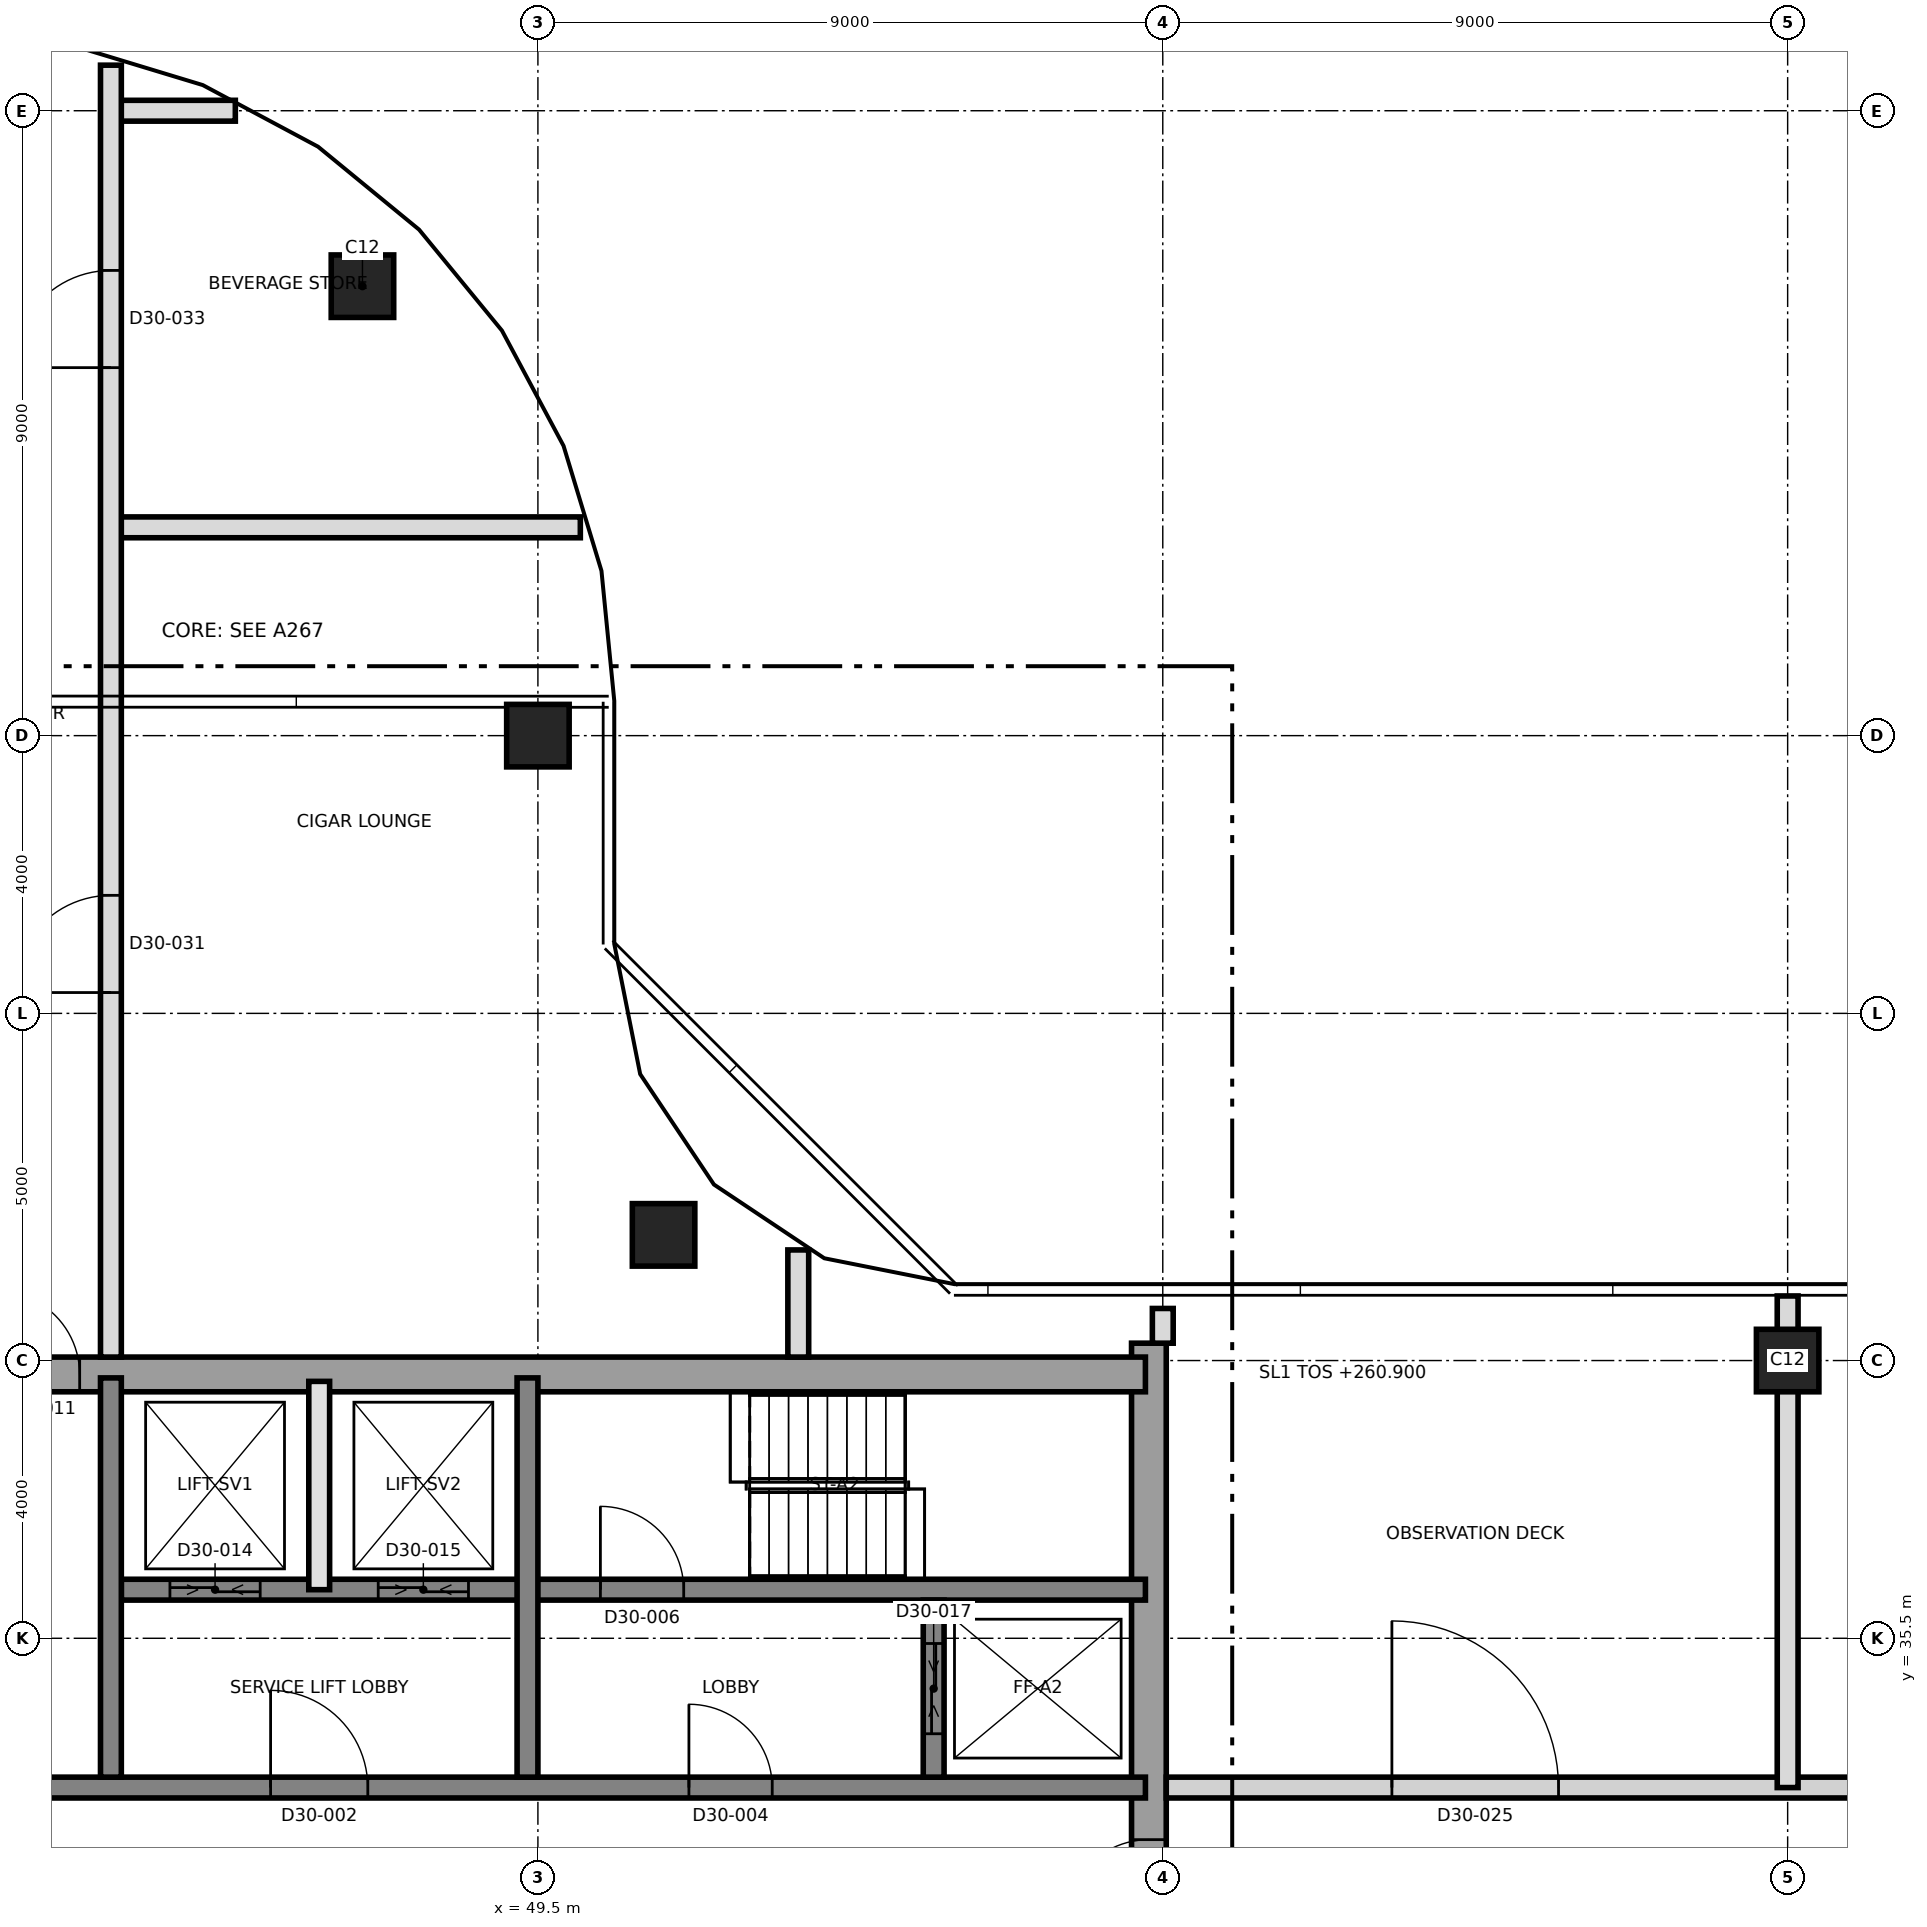
"""IFC4 building model, lengths in metres.
Left out: names, types, materials, properties, quantities, classifications, styles, units other than length and angle.
Written with IfcOpenShell. Run it as: python <this file> out.ifc"""

import sys

from ifc_helpers import new_model, si_unit, direction, frame, frame_2d, origin, origin_2d, place, context, subcontext, project, spatial, rectangle, extrude, element, fill, save


model = new_model("IFC4")
c1 = context("Model", 3, precision=1e-05, world=origin(), true_north=direction((0.0, 1.0)))
c2 = subcontext(c1, "Body", "Model", "MODEL_VIEW")
j1 = project(units=[si_unit("LENGTHUNIT", "METRE"), si_unit("PLANEANGLEUNIT", "RADIAN")], contexts=[c1])
p1 = place(None, origin())
s1 = spatial("IfcSite", under=j1, at=p1, CompositionType="ELEMENT")
p2 = place(p1, origin())
s2 = spatial("IfcBuilding", under=s1, at=p2, CompositionType="ELEMENT")
p3 = place(p2, frame((0.0, 0.0, 260.9)))
s3 = spatial("IfcBuildingStorey", under=s2, at=p3, CompositionType="ELEMENT", Elevation=260.9)
p4 = place(p3, frame((58.3, 21.25, 0.0), z_axis=(0.0, 0.0, 1.0), x_axis=(0.0, 1.0, 0.0)))
e1 = element("IfcWall", 1, at=p4, inside=s3, PredefinedType="SHEAR", context=c2, shape_type="SweptSolid", body=[
    extrude(rectangle(XDim=18.5, YDim=0.5, at=frame_2d((9.25, 0.0))), origin(), (0.0, 0.0, 1.0), 6.0),
])
p5 = place(p4, frame((10.15, 0.0, 0.0)))
e2 = element("IfcOpeningElement", 2, at=p5, cuts=e1, PredefinedType="OPENING", context=c2, shape_type="SweptSolid", body=[
    extrude(rectangle(XDim=1.2, YDim=2.1, at=frame_2d((0.6, 1.05))), frame((0.0, 0.26, 0.0), z_axis=(0.0, -1.0, 0.0), x_axis=(1.0, 0.0, 0.0)), (0.0, 0.0, 1.0), 0.52),
])
p6 = place(p3, frame((31.25, 39.3, 0.0), z_axis=(0.0, 0.0, 1.0), x_axis=(1.0, 0.0, 0.0)))
e3 = element("IfcWall", 3, at=p6, inside=s3, PredefinedType="SHEAR", context=c2, shape_type="SweptSolid", body=[
    extrude(rectangle(XDim=27.0, YDim=0.5, at=frame_2d((13.5, 0.0))), origin(), (0.0, 0.0, 1.0), 6.0),
])
p7 = place(p6, frame((10.45, 0.0, 0.0)))
e4 = element("IfcOpeningElement", 4, at=p7, cuts=e3, PredefinedType="OPENING", context=c2, shape_type="SweptSolid", body=[
    extrude(rectangle(XDim=1.2, YDim=2.1, at=frame_2d((0.6, 1.05))), frame((0.0, 0.26, 0.0), z_axis=(0.0, -1.0, 0.0), x_axis=(1.0, 0.0, 0.0)), (0.0, 0.0, 1.0), 0.52),
])
p8 = place(p3, frame((31.75, 33.35, 0.0), z_axis=(0.0, 0.0, 1.0), x_axis=(1.0, 0.0, 0.0)))
e5 = element("IfcWall", 5, at=p8, inside=s3, PredefinedType="SHEAR", context=c2, shape_type="SweptSolid", body=[
    extrude(rectangle(XDim=26.5, YDim=0.3, at=frame_2d((13.25, 0.0))), origin(), (0.0, 0.0, 1.0), 6.0),
])
p9 = place(p8, frame((13.9, 0.0, 0.0)))
e6 = element("IfcOpeningElement", 6, at=p9, cuts=e5, PredefinedType="OPENING", context=c2, shape_type="SweptSolid", body=[
    extrude(rectangle(XDim=1.4, YDim=2.1, at=frame_2d((0.7, 1.05))), frame((0.0, 0.16, 0.0), z_axis=(0.0, -1.0, 0.0), x_axis=(1.0, 0.0, 0.0)), (0.0, 0.0, 1.0), 0.32),
])
p10 = place(p8, frame((5.375, 0.0, 0.0)))
e7 = element("IfcOpeningElement", 7, at=p10, cuts=e5, PredefinedType="OPENING", context=c2, shape_type="SweptSolid", body=[
    extrude(rectangle(XDim=1.2, YDim=2.1, at=frame_2d((0.6, 1.05))), frame((0.0, 0.16, 0.0), z_axis=(0.0, -1.0, 0.0), x_axis=(1.0, 0.0, 0.0)), (0.0, 0.0, 1.0), 0.32),
])
p11 = place(p8, frame((19.925, 0.0, 0.0)))
e8 = element("IfcOpeningElement", 8, at=p11, cuts=e5, PredefinedType="OPENING", context=c2, shape_type="SweptSolid", body=[
    extrude(rectangle(XDim=1.2, YDim=2.1, at=frame_2d((0.6, 1.05))), frame((0.0, 0.16, 0.0), z_axis=(0.0, -1.0, 0.0), x_axis=(1.0, 0.0, 0.0)), (0.0, 0.0, 1.0), 0.32),
])
p12 = place(p3, frame((43.5, 36.2, 0.0), z_axis=(0.0, 0.0, 1.0), x_axis=(1.0, 0.0, 0.0)))
e9 = element("IfcWall", 9, at=p12, inside=s3, PredefinedType="SHEAR", context=c2, shape_type="SweptSolid", body=[
    extrude(rectangle(XDim=14.75, YDim=0.3, at=frame_2d((7.375, 0.0))), origin(), (0.0, 0.0, 1.0), 6.0),
])
p13 = place(p12, frame((6.9, 0.0, 0.0)))
e10 = element("IfcOpeningElement", 10, at=p13, cuts=e9, PredefinedType="OPENING", context=c2, shape_type="SweptSolid", body=[
    extrude(rectangle(XDim=1.2, YDim=2.1, at=frame_2d((0.6, 1.05))), frame((0.0, 0.16, 0.0), z_axis=(0.0, -1.0, 0.0), x_axis=(1.0, 0.0, 0.0)), (0.0, 0.0, 1.0), 0.32),
])
p14 = place(p12, frame((0.7, 0.0, 0.0)))
e11 = element("IfcOpeningElement", 11, at=p14, cuts=e9, PredefinedType="OPENING", context=c2, shape_type="SweptSolid", body=[
    extrude(rectangle(XDim=1.3, YDim=2.4, at=frame_2d((0.65, 1.2))), frame((0.0, 0.16, 0.0), z_axis=(0.0, -1.0, 0.0), x_axis=(1.0, 0.0, 0.0)), (0.0, 0.0, 1.0), 0.32),
])
p15 = place(p12, frame((3.7, 0.0, 0.0)))
e12 = element("IfcOpeningElement", 12, at=p15, cuts=e9, PredefinedType="OPENING", context=c2, shape_type="SweptSolid", body=[
    extrude(rectangle(XDim=1.3, YDim=2.4, at=frame_2d((0.65, 1.2))), frame((0.0, 0.16, 0.0), z_axis=(0.0, -1.0, 0.0), x_axis=(1.0, 0.0, 0.0)), (0.0, 0.0, 1.0), 0.32),
])
for number, where, z_axis, x_axis in (
    (13, (43.35, 33.5, 0.0), (0.0, 0.0, 1.0), (0.0, 1.0, 0.0)),
    (14, (49.35, 33.5, 0.0), (0.0, 0.0, 1.0), (0.0, 1.0, 0.0)),
):
    element("IfcWall", number, at=place(p3, frame(where, z_axis=z_axis, x_axis=x_axis)), inside=s3, PredefinedType="SHEAR", context=c2, shape_type="SweptSolid", body=[
        extrude(rectangle(XDim=5.75, YDim=0.3, at=frame_2d((2.875, 0.0))), origin(), (0.0, 0.0, 1.0), 6.0),
    ])
p16 = place(p3, frame((55.2, 33.5, 0.0), z_axis=(0.0, 0.0, 1.0), x_axis=(0.0, 1.0, 0.0)))
e15 = element("IfcWall", 15, at=p16, inside=s3, PredefinedType="SHEAR", context=c2, shape_type="SweptSolid", body=[
    extrude(rectangle(XDim=2.55, YDim=0.3, at=frame_2d((1.275, 0.0))), origin(), (0.0, 0.0, 1.0), 6.0),
])
p17 = place(p16, frame((0.625, 0.0, 0.0)))
e16 = element("IfcOpeningElement", 16, at=p17, cuts=e15, PredefinedType="OPENING", context=c2, shape_type="SweptSolid", body=[
    extrude(rectangle(XDim=1.3, YDim=2.4, at=frame_2d((0.65, 1.2))), frame((0.0, 0.16, 0.0), z_axis=(0.0, -1.0, 0.0), x_axis=(1.0, 0.0, 0.0)), (0.0, 0.0, 1.0), 0.32),
])
for number, where, z_axis, x_axis in (
    (17, (67.5, 39.5, 0.0), (0.0, 0.0, 1.0), (1.0, 0.0, 0.0)),
    (18, (51.31, 41.31, 0.0), (0.0, 0.0, 1.0), (1.0, 0.0, 0.0)),
    (19, (49.5, 48.5, 0.0), (0.0, 0.0, 1.0), (1.0, 0.0, 0.0)),
    (20, (46.973, 54.973, 0.0), (0.0, 0.0, 1.0), (1.0, 0.0, 0.0)),
):
    element("IfcColumn", number, at=place(p3, frame(where, z_axis=z_axis, x_axis=x_axis)), inside=s3, PredefinedType="COLUMN", context=c2, shape_type="SweptSolid", body=[
        extrude(rectangle(XDim=0.9, YDim=0.9, at=origin_2d()), origin(), (0.0, 0.0, 1.0), 6.0),
    ])
p18 = place(p3, frame((46.35, 36.2, 0.0), z_axis=(0.0, 0.0, 1.0), x_axis=(0.0, 1.0, 0.0)))
e21 = element("IfcWall", 21, at=p18, inside=s3, PredefinedType="SOLIDWALL", context=c2, shape_type="SweptSolid", body=[
    extrude(rectangle(XDim=3.0, YDim=0.3, at=frame_2d((1.5, 0.0))), origin(), (0.0, 0.0, 1.0), 5.7),
])
p19 = place(p3, frame((58.55, 33.35, 0.0), z_axis=(0.0, 0.0, 1.0), x_axis=(1.0, 0.0, 0.0)))
e22 = element("IfcWall", 22, at=p19, inside=s3, PredefinedType="PARTITIONING", context=c2, shape_type="SweptSolid", body=[
    extrude(rectangle(XDim=26.78, YDim=0.3, at=frame_2d((13.39, 0.0))), origin(), (0.0, 0.0, 1.0), 5.7),
])
p20 = place(p19, frame((3.25, 0.0, 0.0)))
e23 = element("IfcOpeningElement", 23, at=p20, cuts=e22, PredefinedType="OPENING", context=c2, shape_type="SweptSolid", body=[
    extrude(rectangle(XDim=2.4, YDim=2.4, at=frame_2d((1.2, 1.2))), frame((0.0, 0.16, 0.0), z_axis=(0.0, -1.0, 0.0), x_axis=(1.0, 0.0, 0.0)), (0.0, 0.0, 1.0), 0.32),
])
p21 = place(p19, frame((16.75, 0.0, 0.0)))
e24 = element("IfcOpeningElement", 24, at=p21, cuts=e22, PredefinedType="OPENING", context=c2, shape_type="SweptSolid", body=[
    extrude(rectangle(XDim=2.4, YDim=2.4, at=frame_2d((1.2, 1.2))), frame((0.0, 0.16, 0.0), z_axis=(0.0, -1.0, 0.0), x_axis=(1.0, 0.0, 0.0)), (0.0, 0.0, 1.0), 0.32),
])
p22 = place(p3, frame((43.35, 51.5, 0.0), z_axis=(0.0, 0.0, 1.0), x_axis=(1.0, 0.0, 0.0)))
e25 = element("IfcWall", 25, at=p22, inside=s3, PredefinedType="PARTITIONING", context=c2, shape_type="SweptSolid", body=[
    extrude(rectangle(XDim=6.761, YDim=0.3, at=frame_2d((3.38, 0.0))), origin(), (0.0, 0.0, 1.0), 5.65),
])
p23 = place(p3, frame((43.35, 57.5, 0.0), z_axis=(0.0, 0.0, 1.0), x_axis=(1.0, 0.0, 0.0)))
e26 = element("IfcWall", 26, at=p23, inside=s3, PredefinedType="PARTITIONING", context=c2, shape_type="SweptSolid", body=[
    extrude(rectangle(XDim=1.792, YDim=0.3, at=frame_2d((0.896, 0.0))), origin(), (0.0, 0.0, 1.0), 5.65),
])
p24 = place(p3, frame((43.35, 39.55, 0.0), z_axis=(0.0, 0.0, 1.0), x_axis=(0.0, 1.0, 0.0)))
e27 = element("IfcWall", 27, at=p24, inside=s3, PredefinedType="PARTITIONING", context=c2, shape_type="SweptSolid", body=[
    extrude(rectangle(XDim=18.606, YDim=0.3, at=frame_2d((9.303, 0.0))), origin(), (0.0, 0.0, 1.0), 5.65),
])
p25 = place(p24, frame((5.25, 0.0, 0.0)))
e28 = element("IfcOpeningElement", 28, at=p25, cuts=e27, PredefinedType="OPENING", context=c2, shape_type="SweptSolid", body=[
    extrude(rectangle(XDim=1.4, YDim=2.1, at=frame_2d((0.7, 1.05))), frame((0.0, 0.16, 0.0), z_axis=(0.0, -1.0, 0.0), x_axis=(1.0, 0.0, 0.0)), (0.0, 0.0, 1.0), 0.32),
])
p26 = place(p24, frame((14.25, 0.0, 0.0)))
e29 = element("IfcOpeningElement", 29, at=p26, cuts=e27, PredefinedType="OPENING", context=c2, shape_type="SweptSolid", body=[
    extrude(rectangle(XDim=1.4, YDim=2.1, at=frame_2d((0.7, 1.05))), frame((0.0, 0.16, 0.0), z_axis=(0.0, -1.0, 0.0), x_axis=(1.0, 0.0, 0.0)), (0.0, 0.0, 1.0), 0.32),
])
p27 = place(p3, frame((53.25, 39.55, 0.0), z_axis=(0.0, 0.0, 1.0), x_axis=(0.0, 1.0, 0.0)))
e30 = element("IfcWall", 30, at=p27, inside=s3, PredefinedType="PARTITIONING", context=c2, shape_type="SweptSolid", body=[
    extrude(rectangle(XDim=1.543, YDim=0.3, at=frame_2d((0.771, 0.0))), origin(), (0.0, 0.0, 1.0), 5.7),
])
p28 = place(p3, frame((58.5, 39.75, 0.0), z_axis=(0.0, 0.0, 1.0), x_axis=(0.0, 1.0, 0.0)))
e31 = element("IfcWall", 31, at=p28, inside=s3, PredefinedType="PARTITIONING", context=c2, shape_type="SweptSolid", body=[
    extrude(rectangle(XDim=0.5, YDim=0.3, at=frame_2d((0.25, 0.0))), origin(), (0.0, 0.0, 1.0), 5.7),
])
p29 = place(p3, frame((67.5, 33.35, 0.0), z_axis=(0.0, 0.0, 1.0), x_axis=(0.0, 1.0, 0.0)))
e32 = element("IfcWall", 32, at=p29, inside=s3, PredefinedType="PARTITIONING", context=c2, shape_type="SweptSolid", body=[
    extrude(rectangle(XDim=7.08, YDim=0.3, at=frame_2d((3.54, 0.0))), origin(), (0.0, 0.0, 1.0), 5.7),
])
p30 = place(p9, origin())
e33 = element("IfcDoor", 33, at=p30, inside=s3, OperationType="SINGLE_SWING_RIGHT", PredefinedType="DOOR", context=c2, shape_type="SweptSolid", body=[
    extrude(rectangle(XDim=1.4, YDim=2.1, at=frame_2d((0.7, 1.05))), frame((0.0, 0.025, 0.0), z_axis=(0.0, -1.0, 0.0), x_axis=(1.0, 0.0, 0.0)), (0.0, 0.0, 1.0), 0.05),
])
fill(e6, e33)
p31 = place(p11, origin())
e34 = element("IfcDoor", 34, at=p31, inside=s3, OperationType="SINGLE_SWING_RIGHT", PredefinedType="DOOR", context=c2, shape_type="SweptSolid", body=[
    extrude(rectangle(XDim=1.2, YDim=2.1, at=frame_2d((0.6, 1.05))), frame((0.0, 0.025, 0.0), z_axis=(0.0, -1.0, 0.0), x_axis=(1.0, 0.0, 0.0)), (0.0, 0.0, 1.0), 0.05),
])
fill(e8, e34)
p32 = place(p13, origin())
e35 = element("IfcDoor", 35, at=p32, inside=s3, OperationType="SINGLE_SWING_LEFT", PredefinedType="DOOR", context=c2, shape_type="SweptSolid", body=[
    extrude(rectangle(XDim=1.2, YDim=2.1, at=frame_2d((0.6, 1.05))), frame((0.0, 0.025, 0.0), z_axis=(0.0, -1.0, 0.0), x_axis=(1.0, 0.0, 0.0)), (0.0, 0.0, 1.0), 0.05),
])
fill(e10, e35)
p33 = place(p5, origin())
e36 = element("IfcDoor", 36, at=p33, inside=s3, OperationType="SINGLE_SWING_LEFT", PredefinedType="DOOR", context=c2, shape_type="SweptSolid", body=[
    extrude(rectangle(XDim=1.2, YDim=2.1, at=frame_2d((0.6, 1.05))), frame((0.0, 0.025, 0.0), z_axis=(0.0, -1.0, 0.0), x_axis=(1.0, 0.0, 0.0)), (0.0, 0.0, 1.0), 0.05),
])
fill(e2, e36)
p34 = place(p7, origin())
e37 = element("IfcDoor", 37, at=p34, inside=s3, OperationType="SINGLE_SWING_RIGHT", PredefinedType="DOOR", context=c2, shape_type="SweptSolid", body=[
    extrude(rectangle(XDim=1.2, YDim=2.1, at=frame_2d((0.6, 1.05))), frame((0.0, 0.025, 0.0), z_axis=(0.0, -1.0, 0.0), x_axis=(1.0, 0.0, 0.0)), (0.0, 0.0, 1.0), 0.05),
])
fill(e4, e37)
p35 = place(p14, origin())
e38 = element("IfcDoor", 38, at=p35, inside=s3, OperationType="SLIDING_TO_LEFT", PredefinedType="DOOR", context=c2, shape_type="SweptSolid", body=[
    extrude(rectangle(XDim=1.3, YDim=2.4, at=frame_2d((0.65, 1.2))), frame((0.0, 0.025, 0.0), z_axis=(0.0, -1.0, 0.0), x_axis=(1.0, 0.0, 0.0)), (0.0, 0.0, 1.0), 0.05),
])
fill(e11, e38)
p36 = place(p15, origin())
e39 = element("IfcDoor", 39, at=p36, inside=s3, OperationType="SLIDING_TO_LEFT", PredefinedType="DOOR", context=c2, shape_type="SweptSolid", body=[
    extrude(rectangle(XDim=1.3, YDim=2.4, at=frame_2d((0.65, 1.2))), frame((0.0, 0.025, 0.0), z_axis=(0.0, -1.0, 0.0), x_axis=(1.0, 0.0, 0.0)), (0.0, 0.0, 1.0), 0.05),
])
fill(e12, e39)
p37 = place(p17, origin())
e40 = element("IfcDoor", 40, at=p37, inside=s3, OperationType="SLIDING_TO_LEFT", PredefinedType="DOOR", context=c2, shape_type="SweptSolid", body=[
    extrude(rectangle(XDim=1.3, YDim=2.4, at=frame_2d((0.65, 1.2))), frame((0.0, 0.025, 0.0), z_axis=(0.0, -1.0, 0.0), x_axis=(1.0, 0.0, 0.0)), (0.0, 0.0, 1.0), 0.05),
])
fill(e16, e40)
p38 = place(p20, origin())
e41 = element("IfcDoor", 41, at=p38, inside=s3, OperationType="SINGLE_SWING_LEFT", PredefinedType="DOOR", context=c2, shape_type="SweptSolid", body=[
    extrude(rectangle(XDim=2.4, YDim=2.4, at=frame_2d((1.2, 1.2))), frame((0.0, 0.025, 0.0), z_axis=(0.0, -1.0, 0.0), x_axis=(1.0, 0.0, 0.0)), (0.0, 0.0, 1.0), 0.05),
])
fill(e23, e41)
p39 = place(p25, origin())
e42 = element("IfcDoor", 42, at=p39, inside=s3, OperationType="SINGLE_SWING_LEFT", PredefinedType="DOOR", context=c2, shape_type="SweptSolid", body=[
    extrude(rectangle(XDim=1.4, YDim=2.1, at=frame_2d((0.7, 1.05))), frame((0.0, 0.025, 0.0), z_axis=(0.0, -1.0, 0.0), x_axis=(1.0, 0.0, 0.0)), (0.0, 0.0, 1.0), 0.05),
])
fill(e28, e42)
p40 = place(p26, origin())
e43 = element("IfcDoor", 43, at=p40, inside=s3, OperationType="SINGLE_SWING_LEFT", PredefinedType="DOOR", context=c2, shape_type="SweptSolid", body=[
    extrude(rectangle(XDim=1.4, YDim=2.1, at=frame_2d((0.7, 1.05))), frame((0.0, 0.025, 0.0), z_axis=(0.0, -1.0, 0.0), x_axis=(1.0, 0.0, 0.0)), (0.0, 0.0, 1.0), 0.05),
])
fill(e29, e43)
save(model, sys.argv[1])
